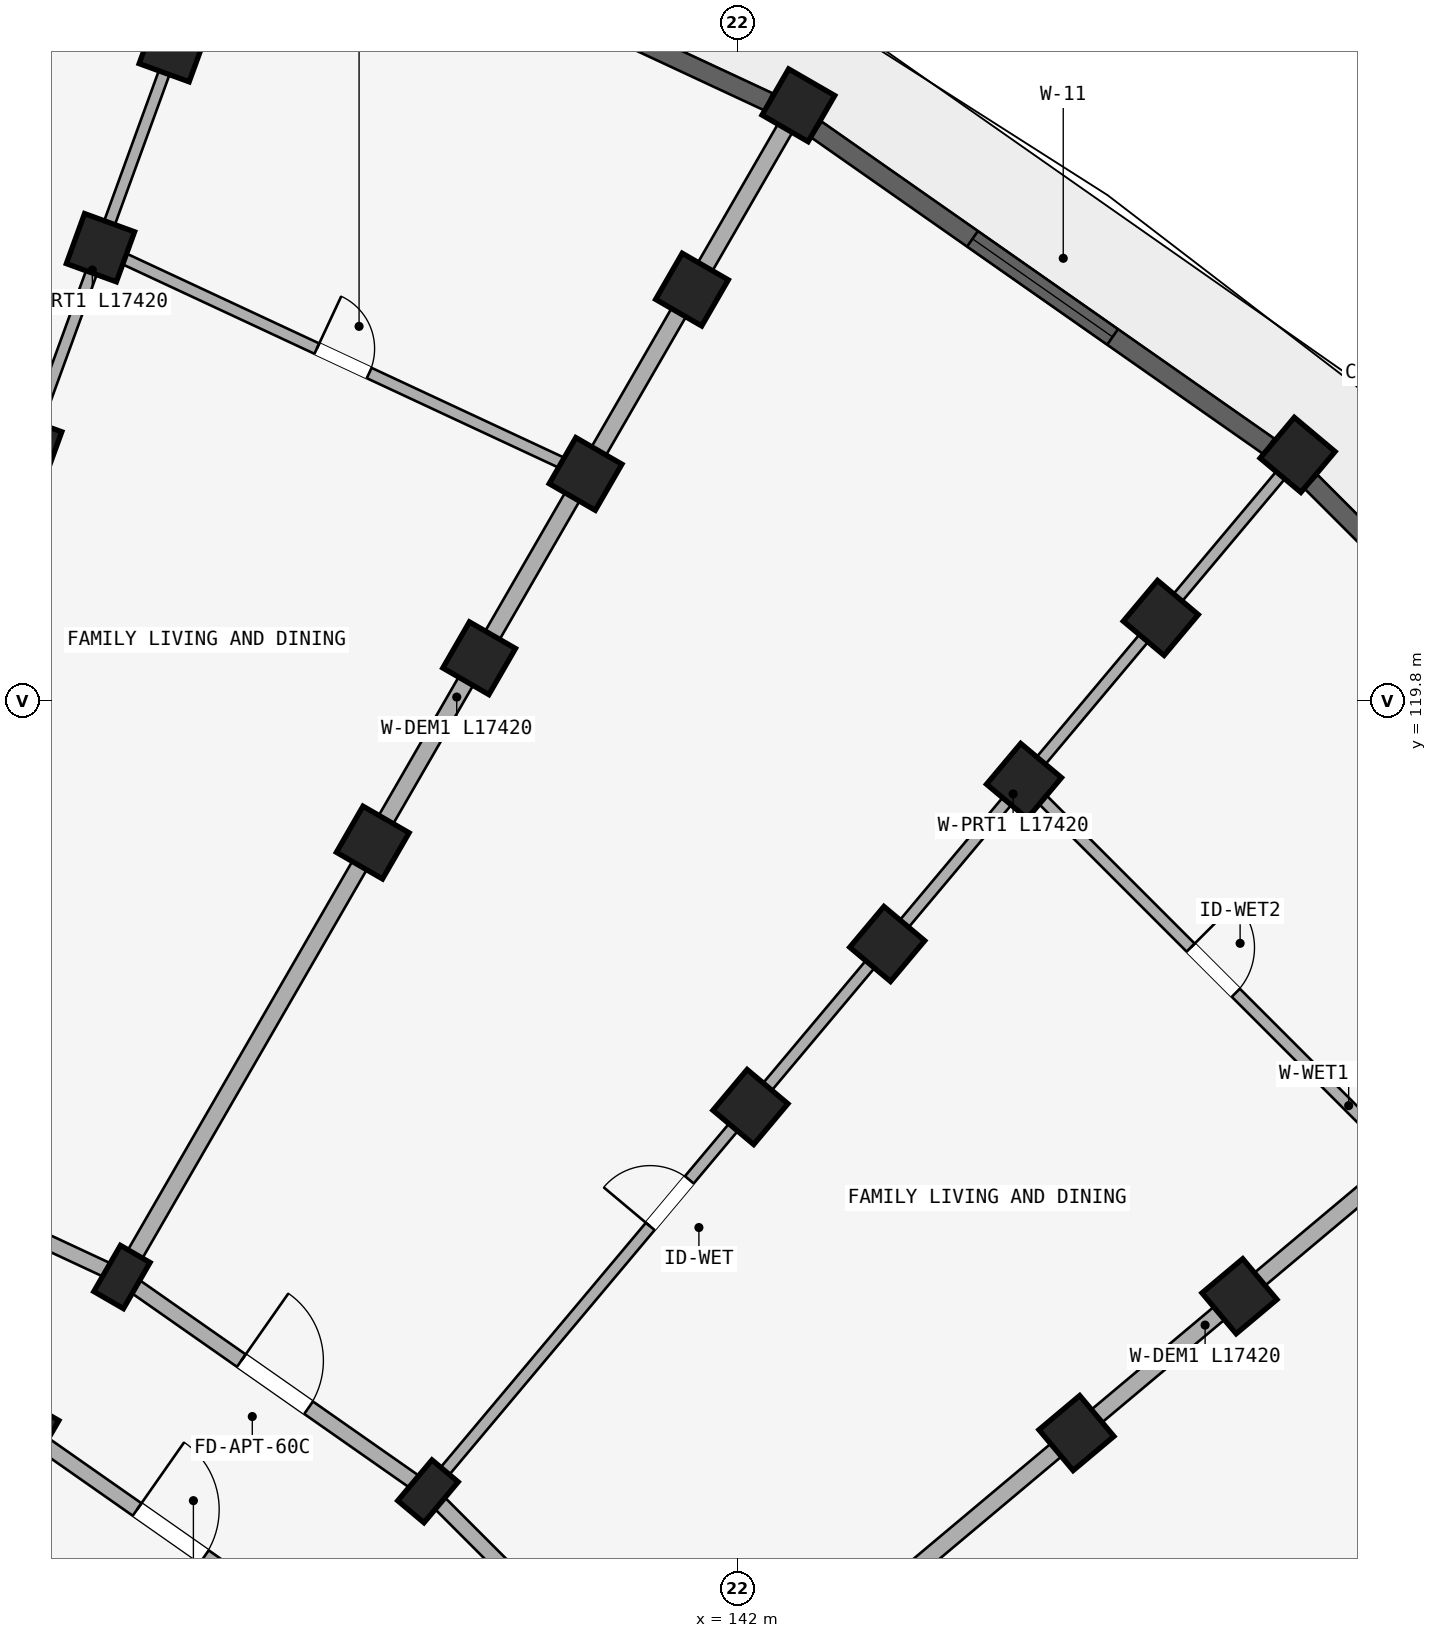
"""IFC4 building model, lengths in metres.
Left out: names, types, materials, properties, quantities, classifications, styles, units other than length and angle.
Written with IfcOpenShell. Run it as: python <this file> out.ifc"""

import sys

from ifc_helpers import new_model, si_unit, direction, frame, frame_2d, origin, origin_2d, place, context, subcontext, project, spatial, rectangle, extrude, element, fill, save


model = new_model("IFC4")
c1 = context("Model", 3, precision=1e-05, world=origin(), true_north=direction((0.0, 1.0)))
c2 = subcontext(c1, "Body", "Model", "MODEL_VIEW")
j1 = project(units=[si_unit("LENGTHUNIT", "METRE"), si_unit("PLANEANGLEUNIT", "RADIAN")], contexts=[c1])
p1 = place(None, origin())
s1 = spatial("IfcSite", under=j1, at=p1, CompositionType="ELEMENT")
p2 = place(p1, origin())
s2 = spatial("IfcBuilding", under=s1, at=p2, CompositionType="ELEMENT")
p3 = place(p2, frame((0.0, 0.0, 21.3)))
s3 = spatial("IfcBuildingStorey", under=s2, at=p3, CompositionType="ELEMENT", Elevation=21.3)
for number, where, z_axis, x_axis in (
    (1, (132.66, 123.132, 0.0), (0.0, 0.0, 1.0), (-0.94, 0.342, 0.0)),
    (2, (133.618, 125.764, 0.0), (0.0, 0.0, 1.0), (-0.94, 0.342, 0.0)),
    (3, (134.575, 128.395, 0.0), (0.0, 0.0, 1.0), (-0.94, 0.342, 0.0)),
):
    element("IfcColumn", number, at=place(p3, frame(where, z_axis=z_axis, x_axis=x_axis)), inside=s3, PredefinedType="COLUMN", context=c2, shape_type="SweptSolid", body=[
        extrude(rectangle(XDim=0.7, YDim=0.7, at=origin_2d()), origin(), (0.0, 0.0, 1.0), 2.93),
    ])
for number, where, z_axis, x_axis in (
    (4, (132.7, 110.144, 0.0), (0.0, 0.0, 1.0), (-0.866, 0.5, 0.0)),
    (5, (133.9, 112.222, 0.0), (0.0, 0.0, 1.0), (-0.866, 0.5, 0.0)),
):
    element("IfcColumn", number, at=place(p3, frame(where, z_axis=z_axis, x_axis=x_axis)), inside=s3, PredefinedType="COLUMN", context=c2, shape_type="SweptSolid", body=[
        extrude(rectangle(XDim=0.45, YDim=0.7, at=origin_2d()), origin(), (0.0, 0.0, 1.0), 2.93),
    ])
for number, where, z_axis, x_axis in (
    (6, (137.2, 117.938, 0.0), (0.0, 0.0, 1.0), (-0.866, 0.5, 0.0)),
    (7, (138.6, 120.363, 0.0), (0.0, 0.0, 1.0), (-0.866, 0.5, 0.0)),
    (8, (140.0, 122.787, 0.0), (0.0, 0.0, 1.0), (-0.866, 0.5, 0.0)),
    (9, (141.4, 125.212, 0.0), (0.0, 0.0, 1.0), (-0.866, 0.5, 0.0)),
    (10, (142.8, 127.637, 0.0), (0.0, 0.0, 1.0), (-0.866, 0.5, 0.0)),
):
    element("IfcColumn", number, at=place(p3, frame(where, z_axis=z_axis, x_axis=x_axis)), inside=s3, PredefinedType="COLUMN", context=c2, shape_type="SweptSolid", body=[
        extrude(rectangle(XDim=0.7, YDim=0.7, at=origin_2d()), origin(), (0.0, 0.0, 1.0), 2.93),
    ])
p4 = place(p3, frame((137.927, 109.402, 0.0), z_axis=(0.0, 0.0, 1.0), x_axis=(-0.766044443119, 0.642787609687, 0.0)))
e11 = element("IfcColumn", 11, at=p4, inside=s3, PredefinedType="COLUMN", context=c2, shape_type="SweptSolid", body=[
    extrude(rectangle(XDim=0.45, YDim=0.7, at=origin_2d()), origin(), (0.0, 0.0, 1.0), 2.93),
])
for number, where, z_axis, x_axis in (
    (12, (142.169, 114.458, 0.0), (0.0, 0.0, 1.0), (-0.766, 0.643, 0.0)),
    (13, (143.969, 116.603, 0.0), (0.0, 0.0, 1.0), (-0.766, 0.643, 0.0)),
    (14, (145.769, 118.748, 0.0), (0.0, 0.0, 1.0), (-0.766, 0.643, 0.0)),
    (15, (147.568, 120.893, 0.0), (0.0, 0.0, 1.0), (-0.766, 0.643, 0.0)),
    (16, (149.368, 123.038, 0.0), (0.0, 0.0, 1.0), (-0.766, 0.643, 0.0)),
    (17, (146.458, 110.169, 0.0), (0.0, 0.0, 1.0), (-0.643, 0.766, 0.0)),
    (18, (148.603, 111.969, 0.0), (0.0, 0.0, 1.0), (-0.643, 0.766, 0.0)),
):
    element("IfcColumn", number, at=place(p3, frame(where, z_axis=z_axis, x_axis=x_axis)), inside=s3, PredefinedType="COLUMN", context=c2, shape_type="SweptSolid", body=[
        extrude(rectangle(XDim=0.7, YDim=0.7, at=origin_2d()), origin(), (0.0, 0.0, 1.0), 2.93),
    ])
p5 = place(p3, frame((129.445, 114.299, 0.0), z_axis=(0.0, 0.0, 1.0), x_axis=(0.906302381024, -0.422629854778, 0.0)))
e19 = element("IfcWall", 19, at=p5, inside=s3, PredefinedType="STANDARD", context=c2, shape_type="SweptSolid", body=[
    extrude(rectangle(XDim=4.915, YDim=0.2, at=frame_2d((2.458, 0.0))), origin(), (0.0, 0.0, 1.0), 2.372),
])
p6 = place(p3, frame((132.7, 110.144, 0.0), z_axis=(0.0, 0.0, 1.0), x_axis=(0.819155404658, -0.573571637217, 0.0)))
e20 = element("IfcWall", 20, at=p6, inside=s3, PredefinedType="STANDARD", context=c2, shape_type="SweptSolid", body=[
    extrude(rectangle(XDim=4.497, YDim=0.2, at=frame_2d((2.249, 0.0))), origin(), (0.0, 0.0, 1.0), 2.372),
])
p7 = place(p6, frame((1.709, 0.0, 0.0)))
e21 = element("IfcOpeningElement", 21, at=p7, cuts=e20, PredefinedType="OPENING", context=c2, shape_type="SweptSolid", body=[
    extrude(rectangle(XDim=1.08, YDim=2.15, at=frame_2d((0.54, 1.075))), frame((0.0, 0.11, 0.0), z_axis=(0.0, -1.0, 0.0), x_axis=(1.0, 0.0, 0.0)), (0.0, 0.0, 1.0), 0.22),
])
p8 = place(p3, frame((133.9, 112.222, 0.0), z_axis=(0.0, 0.0, 1.0), x_axis=(0.819140911474, -0.573592335331, 0.0)))
e22 = element("IfcWall", 22, at=p8, inside=s3, PredefinedType="STANDARD", context=c2, shape_type="SweptSolid", body=[
    extrude(rectangle(XDim=4.916, YDim=0.2, at=frame_2d((2.458, 0.0))), origin(), (0.0, 0.0, 1.0), 2.372),
])
p9 = place(p8, frame((1.918, 0.0, 0.0)))
e23 = element("IfcOpeningElement", 23, at=p9, cuts=e22, PredefinedType="OPENING", context=c2, shape_type="SweptSolid", body=[
    extrude(rectangle(XDim=1.08, YDim=2.15, at=frame_2d((0.54, 1.075))), frame((0.0, 0.11, 0.0), z_axis=(0.0, -1.0, 0.0), x_axis=(1.0, 0.0, 0.0)), (0.0, 0.0, 1.0), 0.22),
])
p10 = place(p3, frame((137.927, 109.402, 0.0), z_axis=(0.0, 0.0, 1.0), x_axis=(0.707106781187, -0.707106781187, 0.0)))
e24 = element("IfcWall", 24, at=p10, inside=s3, PredefinedType="STANDARD", context=c2, shape_type="SweptSolid", body=[
    extrude(rectangle(XDim=4.916, YDim=0.2, at=frame_2d((2.458, 0.0))), origin(), (0.0, 0.0, 1.0), 2.372),
])
p11 = place(p3, frame((129.479, 114.393, 0.0), z_axis=(0.0, 0.0, 1.0), x_axis=(0.342022120477, 0.939691901159, 0.0)))
e25 = element("IfcWall", 25, at=p11, inside=s3, PredefinedType="PARTITIONING", context=c2, shape_type="SweptSolid", body=[
    extrude(rectangle(XDim=17.42, YDim=0.15, at=frame_2d((8.71, 0.0))), origin(), (0.0, 0.0, 1.0), 2.372),
])
p12 = place(p11, frame((4.45, 0.0, 0.0)))
e26 = element("IfcOpeningElement", 26, at=p12, cuts=e25, PredefinedType="OPENING", context=c2, shape_type="SweptSolid", body=[
    extrude(rectangle(XDim=0.8, YDim=2.1, at=frame_2d((0.4, 1.05))), frame((0.0, 0.085, 0.0), z_axis=(0.0, -1.0, 0.0), x_axis=(1.0, 0.0, 0.0)), (0.0, 0.0, 1.0), 0.17),
])
p13 = place(p3, frame((133.95, 112.309, 0.0), z_axis=(0.0, 0.0, 1.0), x_axis=(0.499997843263, 0.866026648973, 0.0)))
e27 = element("IfcWall", 27, at=p13, inside=s3, PredefinedType="STANDARD", context=c2, shape_type="SweptSolid", body=[
    extrude(rectangle(XDim=17.42, YDim=0.22, at=frame_2d((8.71, 0.0))), origin(), (0.0, 0.0, 1.0), 2.372),
])
p14 = place(p3, frame((137.991, 109.479, 0.0), z_axis=(0.0, 0.0, 1.0), x_axis=(0.642784757967, 0.766046835987, 0.0)))
e28 = element("IfcWall", 28, at=p14, inside=s3, PredefinedType="PARTITIONING", context=c2, shape_type="SweptSolid", body=[
    extrude(rectangle(XDim=17.42, YDim=0.15, at=frame_2d((8.71, 0.0))), origin(), (0.0, 0.0, 1.0), 2.372),
])
p15 = place(p14, frame((4.45, 0.0, 0.0)))
e29 = element("IfcOpeningElement", 29, at=p15, cuts=e28, PredefinedType="OPENING", context=c2, shape_type="SweptSolid", body=[
    extrude(rectangle(XDim=0.8, YDim=2.1, at=frame_2d((0.4, 1.05))), frame((0.0, 0.085, 0.0), z_axis=(0.0, -1.0, 0.0), x_axis=(1.0, 0.0, 0.0)), (0.0, 0.0, 1.0), 0.17),
])
p16 = place(p3, frame((141.479, 105.991, 0.0), z_axis=(0.0, 0.0, 1.0), x_axis=(0.766046835987, 0.642784757967, 0.0)))
e30 = element("IfcWall", 30, at=p16, inside=s3, PredefinedType="STANDARD", context=c2, shape_type="SweptSolid", body=[
    extrude(rectangle(XDim=17.42, YDim=0.22, at=frame_2d((8.71, 0.0))), origin(), (0.0, 0.0, 1.0), 2.372),
])
p17 = place(p3, frame((144.309, 101.95, 0.0), z_axis=(0.0, 0.0, 1.0), x_axis=(0.866026648973, 0.499997843263, 0.0)))
e31 = element("IfcWall", 31, at=p17, inside=s3, PredefinedType="PARTITIONING", context=c2, shape_type="SweptSolid", body=[
    extrude(rectangle(XDim=17.42, YDim=0.15, at=frame_2d((8.71, 0.0))), origin(), (0.0, 0.0, 1.0), 2.372),
])
p18 = place(p17, frame((4.45, 0.0, 0.0)))
e32 = element("IfcOpeningElement", 32, at=p18, cuts=e31, PredefinedType="OPENING", context=c2, shape_type="SweptSolid", body=[
    extrude(rectangle(XDim=0.8, YDim=2.1, at=frame_2d((0.4, 1.05))), frame((0.0, 0.085, 0.0), z_axis=(0.0, -1.0, 0.0), x_axis=(1.0, 0.0, 0.0)), (0.0, 0.0, 1.0), 0.17),
])
p19 = place(p3, frame((133.618, 125.764, 0.0), z_axis=(0.0, 0.0, 1.0), x_axis=(0.906297360311, -0.422640621205, 0.0)))
e33 = element("IfcWall", 33, at=p19, inside=s3, PredefinedType="PLUMBINGWALL", context=c2, shape_type="SweptSolid", body=[
    extrude(rectangle(XDim=7.042, YDim=0.15, at=frame_2d((3.521, 0.0))), origin(), (0.0, 0.0, 1.0), 2.372),
])
p20 = place(p19, frame((3.141, 0.0, 0.0)))
e34 = element("IfcOpeningElement", 34, at=p20, cuts=e33, PredefinedType="OPENING", context=c2, shape_type="SweptSolid", body=[
    extrude(rectangle(XDim=0.76, YDim=2.05, at=frame_2d((0.38, 1.025))), frame((0.0, 0.085, 0.0), z_axis=(0.0, -1.0, 0.0), x_axis=(1.0, 0.0, 0.0)), (0.0, 0.0, 1.0), 0.17),
])
p21 = place(p3, frame((145.769, 118.748, 0.0), z_axis=(0.0, 0.0, 1.0), x_axis=(0.707106781187, -0.707106781187, 0.0)))
e35 = element("IfcWall", 35, at=p21, inside=s3, PredefinedType="PLUMBINGWALL", context=c2, shape_type="SweptSolid", body=[
    extrude(rectangle(XDim=7.042, YDim=0.15, at=frame_2d((3.521, 0.0))), origin(), (0.0, 0.0, 1.0), 2.372),
])
p22 = place(p21, frame((3.101, 0.0, 0.0)))
e36 = element("IfcOpeningElement", 36, at=p22, cuts=e35, PredefinedType="OPENING", context=c2, shape_type="SweptSolid", body=[
    extrude(rectangle(XDim=0.84, YDim=2.1, at=frame_2d((0.42, 1.05))), frame((0.0, 0.085, 0.0), z_axis=(0.0, -1.0, 0.0), x_axis=(1.0, 0.0, 0.0)), (0.0, 0.0, 1.0), 0.17),
])
p23 = place(p3, frame((135.821, 130.754, 0.0), z_axis=(0.0, 0.0, 1.0), x_axis=(0.90630327107, -0.422627946127, 0.0)))
e37 = element("IfcWall", 37, at=p23, inside=s3, PredefinedType="STANDARD", context=c2, shape_type="SweptSolid", body=[
    extrude(rectangle(XDim=7.267, YDim=0.25, at=frame_2d((3.633, 0.0))), origin(), (0.0, 0.0, 1.0), 2.472),
])
p24 = place(p23, frame((2.808, 0.0, 0.522)))
e38 = element("IfcOpeningElement", 38, at=p24, cuts=e37, PredefinedType="OPENING", context=c2, shape_type="SweptSolid", body=[
    extrude(rectangle(XDim=1.65, YDim=1.75, at=frame_2d((0.825, 0.875))), frame((0.0, 0.135, 0.0), z_axis=(0.0, -1.0, 0.0), x_axis=(1.0, 0.0, 0.0)), (0.0, 0.0, 1.0), 0.27),
])
p25 = place(p3, frame((143.036, 127.319, 0.0), z_axis=(0.0, 0.0, 1.0), x_axis=(0.819159308599, -0.573566061701, 0.0)))
e39 = element("IfcWall", 39, at=p25, inside=s3, PredefinedType="STANDARD", context=c2, shape_type="SweptSolid", body=[
    extrude(rectangle(XDim=7.267, YDim=0.25, at=frame_2d((3.633, 0.0))), origin(), (0.0, 0.0, 1.0), 2.472),
])
p26 = place(p25, frame((2.508, 0.0, 0.322)))
e40 = element("IfcOpeningElement", 40, at=p26, cuts=e39, PredefinedType="OPENING", context=c2, shape_type="SweptSolid", body=[
    extrude(rectangle(XDim=2.25, YDim=1.95, at=frame_2d((1.125, 0.975))), frame((0.0, 0.135, 0.0), z_axis=(0.0, -1.0, 0.0), x_axis=(1.0, 0.0, 0.0)), (0.0, 0.0, 1.0), 0.27),
])
p27 = place(p3, frame((149.546, 122.684, 0.0), z_axis=(0.0, 0.0, 1.0), x_axis=(0.707106781187, -0.707106781187, 0.0)))
e41 = element("IfcWall", 41, at=p27, inside=s3, PredefinedType="STANDARD", context=c2, shape_type="SweptSolid", body=[
    extrude(rectangle(XDim=7.267, YDim=0.25, at=frame_2d((3.633, 0.0))), origin(), (0.0, 0.0, 1.0), 2.472),
])
p28 = place(p27, frame((4.766, 0.0, 0.472)))
e42 = element("IfcOpeningElement", 42, at=p28, cuts=e41, PredefinedType="OPENING", context=c2, shape_type="SweptSolid", body=[
    extrude(rectangle(XDim=1.2, YDim=1.5, at=frame_2d((0.6, 0.75))), frame((0.0, 0.135, 0.0), z_axis=(0.0, -1.0, 0.0), x_axis=(1.0, 0.0, 0.0)), (0.0, 0.0, 1.0), 0.27),
])
p29 = place(p27, frame((1.883, 0.0, 0.0)))
e43 = element("IfcOpeningElement", 43, at=p29, cuts=e41, PredefinedType="OPENING", context=c2, shape_type="SweptSolid", body=[
    extrude(rectangle(XDim=1.32, YDim=2.15, at=frame_2d((0.66, 1.075))), frame((0.0, 0.135, 0.0), z_axis=(0.0, -1.0, 0.0), x_axis=(1.0, 0.0, 0.0)), (0.0, 0.0, 1.0), 0.27),
])
p30 = place(p26, origin())
e44 = element("IfcWindow", 44, at=p30, inside=s3, PartitioningType="TRIPLE_PANEL_VERTICAL", PredefinedType="WINDOW", context=c2, shape_type="SweptSolid", body=[
    extrude(rectangle(XDim=2.25, YDim=1.95, at=frame_2d((1.125, 0.975))), frame((0.0, 0.03, 0.0), z_axis=(0.0, -1.0, 0.0), x_axis=(1.0, 0.0, 0.0)), (0.0, 0.0, 1.0), 0.06),
])
fill(e40, e44)
p31 = place(p15, origin())
e45 = element("IfcDoor", 45, at=p31, inside=s3, OperationType="SINGLE_SWING_LEFT", PredefinedType="DOOR", context=c2, shape_type="SweptSolid", body=[
    extrude(rectangle(XDim=0.8, YDim=2.1, at=frame_2d((0.4, 1.05))), frame((0.0, 0.025, 0.0), z_axis=(0.0, -1.0, 0.0), x_axis=(1.0, 0.0, 0.0)), (0.0, 0.0, 1.0), 0.05),
])
fill(e29, e45)
p32 = place(p20, frame((0.76, 0.0, 0.0), z_axis=(0.0, 0.0, 1.0), x_axis=(-1.0, 0.0, 0.0)))
e46 = element("IfcDoor", 46, at=p32, inside=s3, OperationType="SINGLE_SWING_RIGHT", PredefinedType="DOOR", context=c2, shape_type="SweptSolid", body=[
    extrude(rectangle(XDim=0.76, YDim=2.05, at=frame_2d((0.38, 1.025))), frame((0.0, 0.025, 0.0), z_axis=(0.0, -1.0, 0.0), x_axis=(1.0, 0.0, 0.0)), (0.0, 0.0, 1.0), 0.05),
])
fill(e34, e46)
p33 = place(p9, origin())
e47 = element("IfcDoor", 47, at=p33, inside=s3, OperationType="SINGLE_SWING_LEFT", PredefinedType="DOOR", context=c2, shape_type="SweptSolid", body=[
    extrude(rectangle(XDim=1.08, YDim=2.15, at=frame_2d((0.54, 1.075))), frame((0.0, 0.025, 0.0), z_axis=(0.0, -1.0, 0.0), x_axis=(1.0, 0.0, 0.0)), (0.0, 0.0, 1.0), 0.05),
])
fill(e23, e47)
p34 = place(p22, frame((0.84, 0.0, 0.0), z_axis=(0.0, 0.0, 1.0), x_axis=(-1.0, 0.0, 0.0)))
e48 = element("IfcDoor", 48, at=p34, inside=s3, OperationType="SINGLE_SWING_RIGHT", PredefinedType="DOOR", context=c2, shape_type="SweptSolid", body=[
    extrude(rectangle(XDim=0.84, YDim=2.1, at=frame_2d((0.42, 1.05))), frame((0.0, 0.025, 0.0), z_axis=(0.0, -1.0, 0.0), x_axis=(1.0, 0.0, 0.0)), (0.0, 0.0, 1.0), 0.05),
])
fill(e36, e48)
p35 = place(p7, frame((1.08, 0.0, 0.0), z_axis=(0.0, 0.0, 1.0), x_axis=(-1.0, 0.0, 0.0)))
e49 = element("IfcDoor", 49, at=p35, inside=s3, OperationType="SINGLE_SWING_RIGHT", PredefinedType="DOOR", context=c2, shape_type="SweptSolid", body=[
    extrude(rectangle(XDim=1.08, YDim=2.15, at=frame_2d((0.54, 1.075))), frame((0.0, 0.025, 0.0), z_axis=(0.0, -1.0, 0.0), x_axis=(1.0, 0.0, 0.0)), (0.0, 0.0, 1.0), 0.05),
])
fill(e21, e49)
save(model, sys.argv[1])
